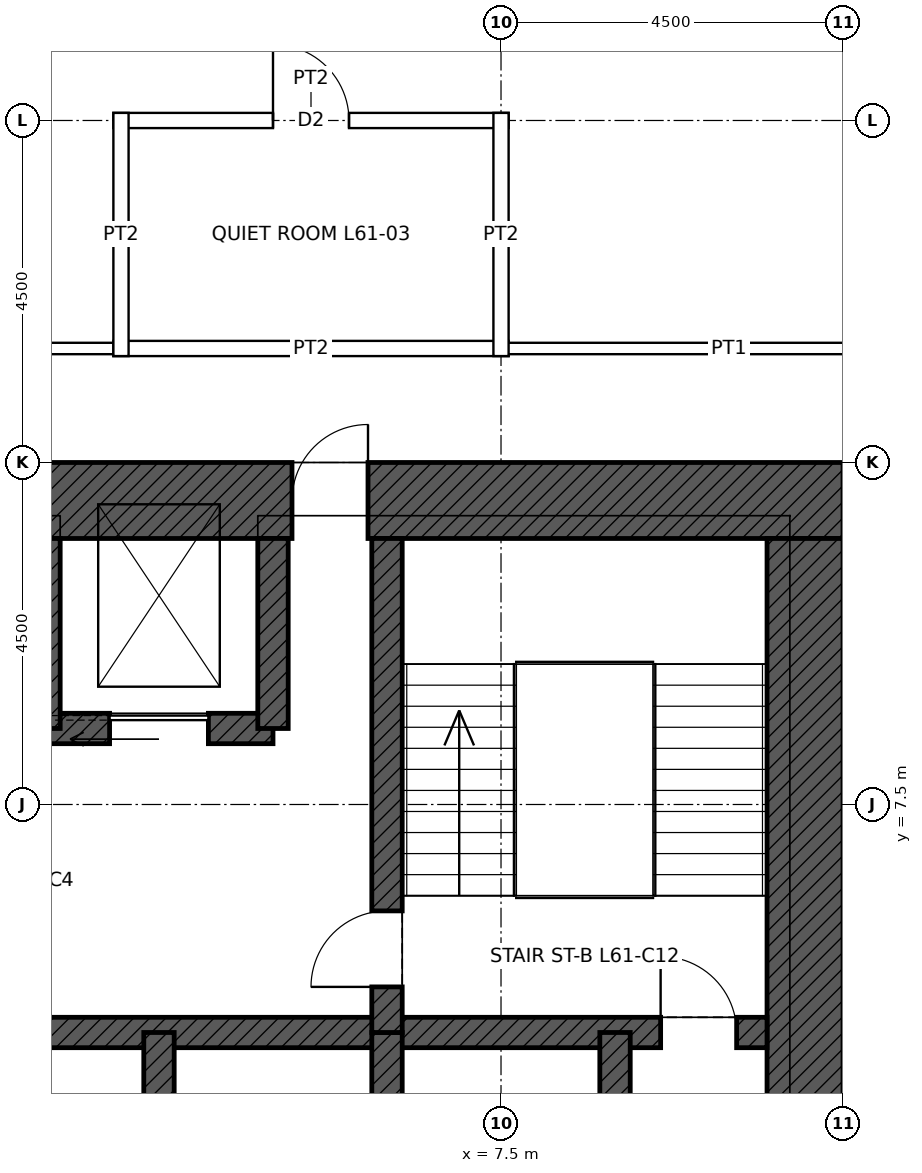
"""IFC4 building model, lengths in metres.
Left out: names, types, materials, properties, quantities, classifications, styles, units other than length and angle.
Written with IfcOpenShell. Run it as: python <this file> out.ifc"""

import sys

from ifc_helpers import new_model, si_unit, direction, frame, frame_2d, origin, place, context, subcontext, project, spatial, rectangle, extrude, element, fill, save


model = new_model("IFC4")
c1 = context("Model", 3, precision=1e-05, world=origin(), true_north=direction((0.0, 1.0)))
c2 = subcontext(c1, "Body", "Model", "MODEL_VIEW")
j1 = project(units=[si_unit("LENGTHUNIT", "METRE"), si_unit("PLANEANGLEUNIT", "RADIAN")], contexts=[c1])
p1 = place(None, origin())
s1 = spatial("IfcSite", under=j1, at=p1, CompositionType="ELEMENT")
p2 = place(p1, origin())
s2 = spatial("IfcBuilding", under=s1, at=p2, CompositionType="ELEMENT")
p3 = place(p2, frame((0.0, 0.0, 279.9)))
s3 = spatial("IfcBuildingStorey", under=s2, at=p3, CompositionType="ELEMENT", Elevation=279.9)
p4 = place(p3, frame((-12.0, 11.5, 0.0), z_axis=(0.0, 0.0, 1.0), x_axis=(1.0, 0.0, 0.0)))
e1 = element("IfcWall", 1, at=p4, inside=s3, PredefinedType="SHEAR", context=c2, shape_type="SweptSolid", body=[
    extrude(rectangle(XDim=24.0, YDim=1.0, at=frame_2d((12.0, 0.0))), origin(), (0.0, 0.0, 1.0), 4.0),
])
p5 = place(p4, frame((6.25, 0.0, 0.0)))
e2 = element("IfcOpeningElement", 2, at=p5, cuts=e1, PredefinedType="OPENING", context=c2, shape_type="SweptSolid", body=[
    extrude(rectangle(XDim=1.0, YDim=2.4, at=frame_2d((0.5, 1.2))), frame((0.0, 0.51, 0.0), z_axis=(0.0, -1.0, 0.0), x_axis=(1.0, 0.0, 0.0)), (0.0, 0.0, 1.0), 1.02),
])
p6 = place(p4, frame((16.75, 0.0, 0.0)))
e3 = element("IfcOpeningElement", 3, at=p6, cuts=e1, PredefinedType="OPENING", context=c2, shape_type="SweptSolid", body=[
    extrude(rectangle(XDim=1.0, YDim=2.4, at=frame_2d((0.5, 1.2))), frame((0.0, 0.51, 0.0), z_axis=(0.0, -1.0, 0.0), x_axis=(1.0, 0.0, 0.0)), (0.0, 0.0, 1.0), 1.02),
])
p7 = place(p3, frame((11.5, 11.0, 0.0), z_axis=(0.0, 0.0, 1.0), x_axis=(0.0, -1.0, 0.0)))
e4 = element("IfcWall", 4, at=p7, inside=s3, PredefinedType="SHEAR", context=c2, shape_type="SweptSolid", body=[
    extrude(rectangle(XDim=22.0, YDim=1.0, at=frame_2d((11.0, 0.0))), origin(), (0.0, 0.0, 1.0), 4.0),
])
p8 = place(p7, frame((10.5, 0.0, 0.0)))
e5 = element("IfcOpeningElement", 5, at=p8, cuts=e4, PredefinedType="OPENING", context=c2, shape_type="SweptSolid", body=[
    extrude(rectangle(XDim=1.0, YDim=2.4, at=frame_2d((0.5, 1.2))), frame((0.0, 0.51, 0.0), z_axis=(0.0, -1.0, 0.0), x_axis=(1.0, 0.0, 0.0)), (0.0, 0.0, 1.0), 1.02),
])
p9 = place(p3, frame((-11.0, 4.5, 0.0), z_axis=(0.0, 0.0, 1.0), x_axis=(1.0, 0.0, 0.0)))
e6 = element("IfcWall", 6, at=p9, inside=s3, PredefinedType="SHEAR", context=c2, shape_type="SweptSolid", body=[
    extrude(rectangle(XDim=22.0, YDim=0.4, at=frame_2d((11.0, 0.0))), origin(), (0.0, 0.0, 1.0), 4.0),
])
p10 = place(p9, frame((0.4, 0.0, 0.0)))
e7 = element("IfcOpeningElement", 7, at=p10, cuts=e6, PredefinedType="OPENING", context=c2, shape_type="SweptSolid", body=[
    extrude(rectangle(XDim=1.0, YDim=2.1, at=frame_2d((0.5, 1.05))), frame((0.0, 0.21, 0.0), z_axis=(0.0, -1.0, 0.0), x_axis=(1.0, 0.0, 0.0)), (0.0, 0.0, 1.0), 0.42),
])
p11 = place(p9, frame((20.6, 0.0, 0.0)))
e8 = element("IfcOpeningElement", 8, at=p11, cuts=e6, PredefinedType="OPENING", context=c2, shape_type="SweptSolid", body=[
    extrude(rectangle(XDim=1.0, YDim=2.1, at=frame_2d((0.5, 1.05))), frame((0.0, 0.21, 0.0), z_axis=(0.0, -1.0, 0.0), x_axis=(1.0, 0.0, 0.0)), (0.0, 0.0, 1.0), 0.42),
])
p12 = place(p3, frame((-4.5, 8.5, 0.0), z_axis=(0.0, 0.0, 1.0), x_axis=(1.0, 0.0, 0.0)))
e9 = element("IfcWall", 9, at=p12, inside=s3, PredefinedType="SHEAR", context=c2, shape_type="SweptSolid", body=[
    extrude(rectangle(XDim=9.0, YDim=0.4, at=frame_2d((4.5, 0.0))), origin(), (0.0, 0.0, 1.0), 4.0),
])
p13 = place(p12, frame((0.85, 0.0, 0.0)))
e10 = element("IfcOpeningElement", 10, at=p13, cuts=e9, PredefinedType="OPENING", context=c2, shape_type="SweptSolid", body=[
    extrude(rectangle(XDim=1.3, YDim=2.4, at=frame_2d((0.65, 1.2))), frame((0.0, 0.21, 0.0), z_axis=(0.0, -1.0, 0.0), x_axis=(1.0, 0.0, 0.0)), (0.0, 0.0, 1.0), 0.42),
])
p14 = place(p12, frame((6.85, 0.0, 0.0)))
e11 = element("IfcOpeningElement", 11, at=p14, cuts=e9, PredefinedType="OPENING", context=c2, shape_type="SweptSolid", body=[
    extrude(rectangle(XDim=1.3, YDim=2.4, at=frame_2d((0.65, 1.2))), frame((0.0, 0.21, 0.0), z_axis=(0.0, -1.0, 0.0), x_axis=(1.0, 0.0, 0.0)), (0.0, 0.0, 1.0), 0.42),
])
p15 = place(p12, frame((3.85, 0.0, 0.0)))
e12 = element("IfcOpeningElement", 12, at=p15, cuts=e9, PredefinedType="OPENING", context=c2, shape_type="SweptSolid", body=[
    extrude(rectangle(XDim=1.3, YDim=2.4, at=frame_2d((0.65, 1.2))), frame((0.0, 0.21, 0.0), z_axis=(0.0, -1.0, 0.0), x_axis=(1.0, 0.0, 0.0)), (0.0, 0.0, 1.0), 0.42),
])
for number, where, z_axis, x_axis in (
    (13, (9.0, 1.5, 0.0), (0.0, 0.0, 1.0), (0.0, 1.0, 0.0)),
    (14, (3.0, 1.5, 0.0), (0.0, 0.0, 1.0), (0.0, 1.0, 0.0)),
    (15, (6.0, 1.5, 0.0), (0.0, 0.0, 1.0), (0.0, 1.0, 0.0)),
):
    element("IfcWall", number, at=place(p3, frame(where, z_axis=z_axis, x_axis=x_axis)), inside=s3, PredefinedType="SHEAR", context=c2, shape_type="SweptSolid", body=[
        extrude(rectangle(XDim=3.0, YDim=0.4, at=frame_2d((1.5, 0.0))), origin(), (0.0, 0.0, 1.0), 4.0),
    ])
p16 = place(p3, frame((6.0, 4.5, 0.0), z_axis=(0.0, 0.0, 1.0), x_axis=(0.0, 1.0, 0.0)))
e16 = element("IfcWall", 16, at=p16, inside=s3, PredefinedType="SHEAR", context=c2, shape_type="SweptSolid", body=[
    extrude(rectangle(XDim=6.5, YDim=0.4, at=frame_2d((3.25, 0.0))), origin(), (0.0, 0.0, 1.0), 4.0),
])
p17 = place(p16, frame((0.6, 0.0, 0.0)))
e17 = element("IfcOpeningElement", 17, at=p17, cuts=e16, PredefinedType="OPENING", context=c2, shape_type="SweptSolid", body=[
    extrude(rectangle(XDim=1.0, YDim=2.1, at=frame_2d((0.5, 1.05))), frame((0.0, 0.21, 0.0), z_axis=(0.0, -1.0, 0.0), x_axis=(1.0, 0.0, 0.0)), (0.0, 0.0, 1.0), 0.42),
])
for number, where, z_axis, x_axis in (
    (18, (4.5, 8.5, 0.0), (0.0, 0.0, 1.0), (0.0, 1.0, 0.0)),
    (19, (1.5, 8.5, 0.0), (0.0, 0.0, 1.0), (0.0, 1.0, 0.0)),
):
    element("IfcWall", number, at=place(p3, frame(where, z_axis=z_axis, x_axis=x_axis)), inside=s3, PredefinedType="SHEAR", context=c2, shape_type="SweptSolid", body=[
        extrude(rectangle(XDim=2.5, YDim=0.4, at=frame_2d((1.25, 0.0))), origin(), (0.0, 0.0, 1.0), 4.0),
    ])
p18 = place(p3, frame((-13.575, 13.5, 0.0), z_axis=(0.0, 0.0, 1.0), x_axis=(1.0, 0.0, 0.0)))
e20 = element("IfcWall", 20, at=p18, inside=s3, PredefinedType="PARTITIONING", context=c2, shape_type="SweptSolid", body=[
    extrude(rectangle(XDim=16.15, YDim=0.15, at=frame_2d((8.075, 0.0))), origin(), (0.0, 0.0, 1.0), 3.85),
])
p19 = place(p3, frame((2.4, 13.5, 0.0), z_axis=(0.0, 0.0, 1.0), x_axis=(1.0, 0.0, 0.0)))
e21 = element("IfcWall", 21, at=p19, inside=s3, PredefinedType="PARTITIONING", context=c2, shape_type="SweptSolid", body=[
    extrude(rectangle(XDim=5.2, YDim=0.2, at=frame_2d((2.6, 0.0))), origin(), (0.0, 0.0, 1.0), 3.85),
])
p20 = place(p3, frame((7.425, 13.5, 0.0), z_axis=(0.0, 0.0, 1.0), x_axis=(1.0, 0.0, 0.0)))
e22 = element("IfcWall", 22, at=p20, inside=s3, PredefinedType="PARTITIONING", context=c2, shape_type="SweptSolid", body=[
    extrude(rectangle(XDim=6.15, YDim=0.15, at=frame_2d((3.075, 0.0))), origin(), (0.0, 0.0, 1.0), 3.85),
])
p21 = place(p3, frame((2.4, 16.5, 0.0), z_axis=(0.0, 0.0, 1.0), x_axis=(1.0, 0.0, 0.0)))
e23 = element("IfcWall", 23, at=p21, inside=s3, PredefinedType="PARTITIONING", context=c2, shape_type="SweptSolid", body=[
    extrude(rectangle(XDim=5.2, YDim=0.2, at=frame_2d((2.6, 0.0))), origin(), (0.0, 0.0, 1.0), 3.85),
])
p22 = place(p21, frame((2.1, 0.0, 0.0)))
e24 = element("IfcOpeningElement", 24, at=p22, cuts=e23, PredefinedType="OPENING", context=c2, shape_type="SweptSolid", body=[
    extrude(rectangle(XDim=1.0, YDim=2.1, at=frame_2d((0.5, 1.05))), frame((0.0, 0.11, 0.0), z_axis=(0.0, -1.0, 0.0), x_axis=(1.0, 0.0, 0.0)), (0.0, 0.0, 1.0), 0.22),
])
p23 = place(p3, frame((2.5, 13.4, 0.0), z_axis=(0.0, 0.0, 1.0), x_axis=(0.0, 1.0, 0.0)))
e25 = element("IfcWall", 25, at=p23, inside=s3, PredefinedType="PARTITIONING", context=c2, shape_type="SweptSolid", body=[
    extrude(rectangle(XDim=3.2, YDim=0.2, at=frame_2d((1.6, 0.0))), origin(), (0.0, 0.0, 1.0), 3.85),
])
p24 = place(p3, frame((7.5, 13.4, 0.0), z_axis=(0.0, 0.0, 1.0), x_axis=(0.0, 1.0, 0.0)))
e26 = element("IfcWall", 26, at=p24, inside=s3, PredefinedType="PARTITIONING", context=c2, shape_type="SweptSolid", body=[
    extrude(rectangle(XDim=3.2, YDim=0.2, at=frame_2d((1.6, 0.0))), origin(), (0.0, 0.0, 1.0), 3.243),
])
p25 = place(p11, origin())
e27 = element("IfcDoor", 27, at=p25, inside=s3, OperationType="SINGLE_SWING_LEFT", PredefinedType="DOOR", context=c2, shape_type="SweptSolid", body=[
    extrude(rectangle(XDim=1.0, YDim=2.1, at=frame_2d((0.5, 1.05))), frame((0.0, 0.025, 0.0), z_axis=(0.0, -1.0, 0.0), x_axis=(1.0, 0.0, 0.0)), (0.0, 0.0, 1.0), 0.05),
])
fill(e8, e27)
p26 = place(p17, origin())
e28 = element("IfcDoor", 28, at=p26, inside=s3, OperationType="SINGLE_SWING_LEFT", PredefinedType="DOOR", context=c2, shape_type="SweptSolid", body=[
    extrude(rectangle(XDim=1.0, YDim=2.1, at=frame_2d((0.5, 1.05))), frame((0.0, 0.025, 0.0), z_axis=(0.0, -1.0, 0.0), x_axis=(1.0, 0.0, 0.0)), (0.0, 0.0, 1.0), 0.05),
])
fill(e17, e28)
p27 = place(p6, origin())
e29 = element("IfcDoor", 29, at=p27, inside=s3, OperationType="SINGLE_SWING_RIGHT", PredefinedType="DOOR", context=c2, shape_type="SweptSolid", body=[
    extrude(rectangle(XDim=1.0, YDim=2.4, at=frame_2d((0.5, 1.2))), frame((0.0, 0.485, 0.0), z_axis=(0.0, -1.0, 0.0), x_axis=(1.0, 0.0, 0.0)), (0.0, 0.0, 1.0), 0.05),
])
fill(e3, e29)
p28 = place(p14, origin())
e30 = element("IfcDoor", 30, at=p28, inside=s3, OperationType="SLIDING_TO_LEFT", PredefinedType="DOOR", context=c2, shape_type="SweptSolid", body=[
    extrude(rectangle(XDim=1.3, YDim=2.4, at=frame_2d((0.65, 1.2))), frame((0.0, 0.025, 0.0), z_axis=(0.0, -1.0, 0.0), x_axis=(1.0, 0.0, 0.0)), (0.0, 0.0, 1.0), 0.05),
])
fill(e11, e30)
p29 = place(p22, origin())
e31 = element("IfcDoor", 31, at=p29, inside=s3, OperationType="SINGLE_SWING_LEFT", PredefinedType="DOOR", context=c2, shape_type="SweptSolid", body=[
    extrude(rectangle(XDim=1.0, YDim=2.1, at=frame_2d((0.5, 1.05))), frame((0.0, 0.025, 0.0), z_axis=(0.0, -1.0, 0.0), x_axis=(1.0, 0.0, 0.0)), (0.0, 0.0, 1.0), 0.05),
])
fill(e24, e31)
save(model, sys.argv[1])
